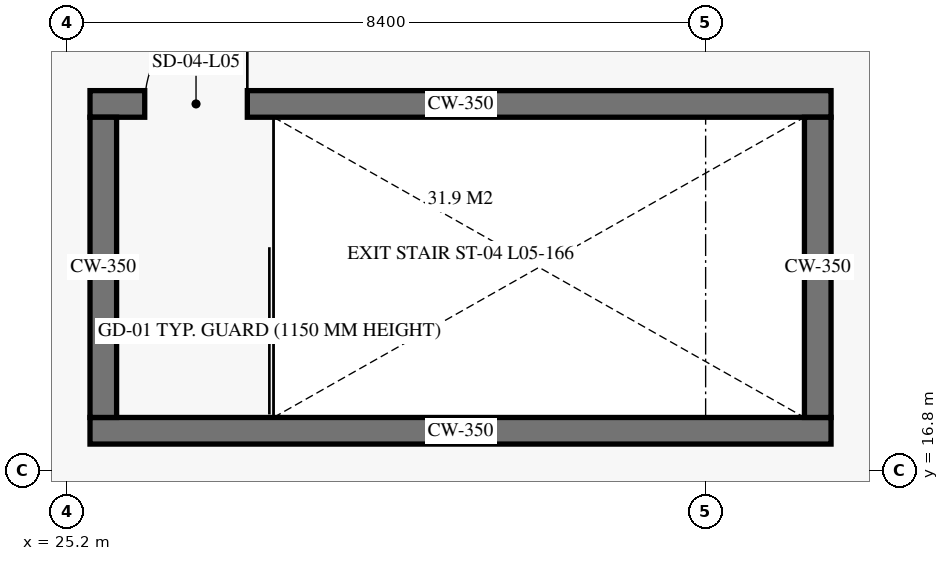
"""IFC4 building model, lengths in metres.
Left out: names, types, materials, properties, quantities, classifications, styles, units other than length and angle.
Written with IfcOpenShell. Run it as: python <this file> out.ifc"""

import sys

from ifc_helpers import new_model, si_unit, direction, frame, frame_2d, origin, place, context, subcontext, project, spatial, rectangle, extrude, element, fill, save


model = new_model("IFC4")
c1 = context("Model", 3, precision=1e-05, world=origin(), true_north=direction((0.0, 1.0)))
c2 = subcontext(c1, "Body", "Model", "MODEL_VIEW")
j1 = project(units=[si_unit("LENGTHUNIT", "METRE"), si_unit("PLANEANGLEUNIT", "RADIAN")], contexts=[c1])
p1 = place(None, origin())
s1 = spatial("IfcSite", under=j1, at=p1, CompositionType="ELEMENT")
p2 = place(p1, origin())
s2 = spatial("IfcBuilding", under=s1, at=p2, CompositionType="ELEMENT")
p3 = place(p2, frame((0.0, 0.0, 22.2)))
s3 = spatial("IfcBuildingStorey", under=s2, at=p3, CompositionType="ELEMENT", Elevation=22.2)
p4 = place(p3, frame((25.5, 17.325, 0.0), z_axis=(0.0, 0.0, 1.0), x_axis=(1.0, 0.0, 0.0)))
e1 = element("IfcWall", 1, at=p4, inside=s3, PredefinedType="SHEAR", context=c2, shape_type="SweptSolid", body=[
    extrude(rectangle(XDim=9.75, YDim=0.35, at=frame_2d((4.875, 0.0))), origin(), (0.0, 0.0, 1.0), 4.22),
])
p5 = place(p3, frame((25.5, 21.625, 0.0), z_axis=(0.0, 0.0, 1.0), x_axis=(1.0, 0.0, 0.0)))
e2 = element("IfcWall", 2, at=p5, inside=s3, PredefinedType="SHEAR", context=c2, shape_type="SweptSolid", body=[
    extrude(rectangle(XDim=9.75, YDim=0.35, at=frame_2d((4.875, 0.0))), origin(), (0.0, 0.0, 1.0), 4.22),
])
p6 = place(p5, frame((0.72, 0.0, 0.0)))
e3 = element("IfcOpeningElement", 3, at=p6, cuts=e2, PredefinedType="OPENING", context=c2, shape_type="SweptSolid", body=[
    extrude(rectangle(XDim=1.35, YDim=2.25, at=frame_2d((0.675, 1.125))), frame((0.0, 0.185, 0.0), z_axis=(0.0, -1.0, 0.0), x_axis=(1.0, 0.0, 0.0)), (0.0, 0.0, 1.0), 0.37),
])
for number, where, z_axis, x_axis in (
    (4, (25.675, 17.5, 0.0), (0.0, 0.0, 1.0), (0.0, 1.0, 0.0)),
    (5, (35.075, 17.5, 0.0), (0.0, 0.0, 1.0), (0.0, 1.0, 0.0)),
):
    element("IfcWall", number, at=place(p3, frame(where, z_axis=z_axis, x_axis=x_axis)), inside=s3, PredefinedType="SHEAR", context=c2, shape_type="SweptSolid", body=[
        extrude(rectangle(XDim=3.95, YDim=0.35, at=frame_2d((1.975, 0.0))), origin(), (0.0, 0.0, 1.0), 4.22),
    ])
p7 = place(p6, origin())
e6 = element("IfcDoor", 6, at=p7, inside=s3, OperationType="SINGLE_SWING_RIGHT", PredefinedType="DOOR", context=c2, shape_type="SweptSolid", body=[
    extrude(rectangle(XDim=1.35, YDim=2.25, at=frame_2d((0.675, 1.125))), frame((0.0, 0.025, 0.0), z_axis=(0.0, -1.0, 0.0), x_axis=(1.0, 0.0, 0.0)), (0.0, 0.0, 1.0), 0.05),
])
fill(e3, e6)
save(model, sys.argv[1])
